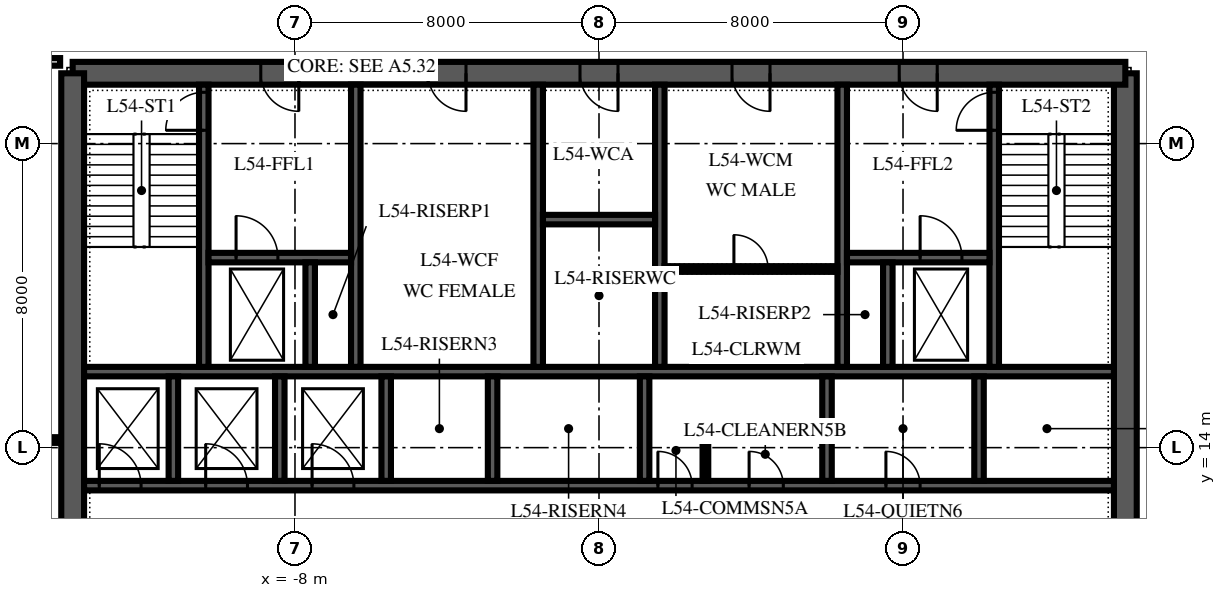
"""IFC4 building model, lengths in metres.
Left out: names, types, materials, properties, quantities, classifications, styles, units other than length and angle.
Written with IfcOpenShell. Run it as: python <this file> out.ifc"""

import sys

from ifc_helpers import new_model, si_unit, direction, frame, frame_2d, origin, place, context, subcontext, project, spatial, polyline, rectangle, outline, extrude, element, fill, save


model = new_model("IFC4")
c1 = context("Model", 3, precision=1e-05, world=origin(), true_north=direction((0.0, 1.0)))
c2 = subcontext(c1, "Body", "Model", "MODEL_VIEW")
j1 = project(units=[si_unit("LENGTHUNIT", "METRE"), si_unit("PLANEANGLEUNIT", "RADIAN")], contexts=[c1])
p1 = place(None, origin())
s1 = spatial("IfcSite", under=j1, at=p1, CompositionType="ELEMENT")
p2 = place(p1, origin())
s2 = spatial("IfcBuilding", under=s1, at=p2, CompositionType="ELEMENT")
p3 = place(p2, frame((0.0, 0.0, 234.0)))
s3 = spatial("IfcBuildingStorey", under=s2, at=p3, CompositionType="ELEMENT", Elevation=234.0)
p4 = place(p3, frame((13.85, 6.15, 0.0), z_axis=(0.0, 0.0, 1.0), x_axis=(0.0, 1.0, 0.0)))
e1 = element("IfcWall", 1, at=p4, inside=s3, PredefinedType="SHEAR", context=c2, shape_type="SweptSolid", body=[
    extrude(outline(polyline([(0.0, -0.3), (17.7, -0.3), (17.7, 0.0), (17.4, 0.0), (17.4, 0.3), (0.3, 0.3), (0.3, 0.0), (0.0, 0.0), (0.0, -0.3)])), origin(), (0.0, 0.0, 1.0), 4.0),
])
p5 = place(p4, frame((4.15, 0.0, 0.0)))
e2 = element("IfcOpeningElement", 2, at=p5, cuts=e1, PredefinedType="OPENING", context=c2, shape_type="SweptSolid", body=[
    extrude(rectangle(XDim=1.8, YDim=2.4, at=frame_2d((0.9, 1.2))), frame((0.0, 0.315, 0.0), z_axis=(0.0, -1.0, 0.0), x_axis=(1.0, 0.0, 0.0)), (0.0, 0.0, 1.0), 0.63),
])
p6 = place(p3, frame((13.85, 23.85, 0.0), z_axis=(0.0, 0.0, 1.0), x_axis=(-1.0, 0.0, 0.0)))
e3 = element("IfcWall", 3, at=p6, inside=s3, PredefinedType="SHEAR", context=c2, shape_type="SweptSolid", body=[
    extrude(rectangle(XDim=27.7, YDim=0.6, at=frame_2d((13.85, 0.0))), origin(), (0.0, 0.0, 1.0), 4.0),
])
p7 = place(p6, frame((21.75, 0.0, 0.0)))
e4 = element("IfcOpeningElement", 4, at=p7, cuts=e3, PredefinedType="OPENING", context=c2, shape_type="SweptSolid", body=[
    extrude(rectangle(XDim=1.0, YDim=2.1, at=frame_2d((0.5, 1.05))), frame((0.0, 0.315, 0.0), z_axis=(0.0, -1.0, 0.0), x_axis=(1.0, 0.0, 0.0)), (0.0, 0.0, 1.0), 0.63),
])
p8 = place(p6, frame((4.95, 0.0, 0.0)))
e5 = element("IfcOpeningElement", 5, at=p8, cuts=e3, PredefinedType="OPENING", context=c2, shape_type="SweptSolid", body=[
    extrude(rectangle(XDim=1.0, YDim=2.1, at=frame_2d((0.5, 1.05))), frame((0.0, 0.315, 0.0), z_axis=(0.0, -1.0, 0.0), x_axis=(1.0, 0.0, 0.0)), (0.0, 0.0, 1.0), 0.63),
])
p9 = place(p6, frame((17.35, 0.0, 0.0)))
e6 = element("IfcOpeningElement", 6, at=p9, cuts=e3, PredefinedType="OPENING", context=c2, shape_type="SweptSolid", body=[
    extrude(rectangle(XDim=1.0, YDim=2.1, at=frame_2d((0.5, 1.05))), frame((0.0, 0.315, 0.0), z_axis=(0.0, -1.0, 0.0), x_axis=(1.0, 0.0, 0.0)), (0.0, 0.0, 1.0), 0.63),
])
p10 = place(p6, frame((13.35, 0.0, 0.0)))
e7 = element("IfcOpeningElement", 7, at=p10, cuts=e3, PredefinedType="OPENING", context=c2, shape_type="SweptSolid", body=[
    extrude(rectangle(XDim=1.0, YDim=2.1, at=frame_2d((0.5, 1.05))), frame((0.0, 0.315, 0.0), z_axis=(0.0, -1.0, 0.0), x_axis=(1.0, 0.0, 0.0)), (0.0, 0.0, 1.0), 0.63),
])
p11 = place(p6, frame((9.35, 0.0, 0.0)))
e8 = element("IfcOpeningElement", 8, at=p11, cuts=e3, PredefinedType="OPENING", context=c2, shape_type="SweptSolid", body=[
    extrude(rectangle(XDim=1.0, YDim=2.1, at=frame_2d((0.5, 1.05))), frame((0.0, 0.315, 0.0), z_axis=(0.0, -1.0, 0.0), x_axis=(1.0, 0.0, 0.0)), (0.0, 0.0, 1.0), 0.63),
])
p12 = place(p3, frame((-13.85, 23.85, 0.0), z_axis=(0.0, 0.0, 1.0), x_axis=(0.0, -1.0, 0.0)))
e9 = element("IfcWall", 9, at=p12, inside=s3, PredefinedType="SHEAR", context=c2, shape_type="SweptSolid", body=[
    extrude(outline(polyline([(0.0, -0.3), (17.7, -0.3), (17.7, 0.0), (17.4, 0.0), (17.4, 0.3), (0.3, 0.3), (0.3, 0.0), (0.0, 0.0), (0.0, -0.3)])), origin(), (0.0, 0.0, 1.0), 4.0),
])
p13 = place(p12, frame((11.75, 0.0, 0.0)))
e10 = element("IfcOpeningElement", 10, at=p13, cuts=e9, PredefinedType="OPENING", context=c2, shape_type="SweptSolid", body=[
    extrude(rectangle(XDim=1.8, YDim=2.4, at=frame_2d((0.9, 1.2))), frame((0.0, 0.315, 0.0), z_axis=(0.0, -1.0, 0.0), x_axis=(1.0, 0.0, 0.0)), (0.0, 0.0, 1.0), 0.63),
])
p14 = place(p3, frame((-13.55, 13.0, 0.0), z_axis=(0.0, 0.0, 1.0), x_axis=(1.0, 0.0, 0.0)))
e11 = element("IfcWall", 11, at=p14, inside=s3, PredefinedType="SHEAR", context=c2, shape_type="SweptSolid", body=[
    extrude(rectangle(XDim=27.1, YDim=0.25, at=frame_2d((13.55, 0.0))), origin(), (0.0, 0.0, 1.0), 4.0),
])
p15 = place(p14, frame((0.4, 0.0, 0.0)))
e12 = element("IfcOpeningElement", 12, at=p15, cuts=e11, PredefinedType="OPENING", context=c2, shape_type="SweptSolid", body=[
    extrude(rectangle(XDim=1.1, YDim=2.1, at=frame_2d((0.55, 1.05))), frame((0.0, 0.14, 0.0), z_axis=(0.0, -1.0, 0.0), x_axis=(1.0, 0.0, 0.0)), (0.0, 0.0, 1.0), 0.28),
])
p16 = place(p14, frame((3.2, 0.0, 0.0)))
e13 = element("IfcOpeningElement", 13, at=p16, cuts=e11, PredefinedType="OPENING", context=c2, shape_type="SweptSolid", body=[
    extrude(rectangle(XDim=1.1, YDim=2.1, at=frame_2d((0.55, 1.05))), frame((0.0, 0.14, 0.0), z_axis=(0.0, -1.0, 0.0), x_axis=(1.0, 0.0, 0.0)), (0.0, 0.0, 1.0), 0.28),
])
p17 = place(p14, frame((6.0, 0.0, 0.0)))
e14 = element("IfcOpeningElement", 14, at=p17, cuts=e11, PredefinedType="OPENING", context=c2, shape_type="SweptSolid", body=[
    extrude(rectangle(XDim=1.1, YDim=2.1, at=frame_2d((0.55, 1.05))), frame((0.0, 0.14, 0.0), z_axis=(0.0, -1.0, 0.0), x_axis=(1.0, 0.0, 0.0)), (0.0, 0.0, 1.0), 0.28),
])
p18 = place(p14, frame((15.1, 0.0, 0.0)))
e15 = element("IfcOpeningElement", 15, at=p18, cuts=e11, PredefinedType="OPENING", context=c2, shape_type="SweptSolid", body=[
    extrude(rectangle(XDim=0.9, YDim=2.1, at=frame_2d((0.45, 1.05))), frame((0.0, 0.14, 0.0), z_axis=(0.0, -1.0, 0.0), x_axis=(1.0, 0.0, 0.0)), (0.0, 0.0, 1.0), 0.28),
])
p19 = place(p14, frame((17.5, 0.0, 0.0)))
e16 = element("IfcOpeningElement", 16, at=p19, cuts=e11, PredefinedType="OPENING", context=c2, shape_type="SweptSolid", body=[
    extrude(rectangle(XDim=0.9, YDim=2.1, at=frame_2d((0.45, 1.05))), frame((0.0, 0.14, 0.0), z_axis=(0.0, -1.0, 0.0), x_axis=(1.0, 0.0, 0.0)), (0.0, 0.0, 1.0), 0.28),
])
p20 = place(p14, frame((21.1, 0.0, 0.0)))
e17 = element("IfcOpeningElement", 17, at=p20, cuts=e11, PredefinedType="OPENING", context=c2, shape_type="SweptSolid", body=[
    extrude(rectangle(XDim=0.9, YDim=2.1, at=frame_2d((0.45, 1.05))), frame((0.0, 0.14, 0.0), z_axis=(0.0, -1.0, 0.0), x_axis=(1.0, 0.0, 0.0)), (0.0, 0.0, 1.0), 0.28),
])
p21 = place(p3, frame((-13.55, 16.0, 0.0), z_axis=(0.0, 0.0, 1.0), x_axis=(1.0, 0.0, 0.0)))
e18 = element("IfcWall", 18, at=p21, inside=s3, PredefinedType="SHEAR", context=c2, shape_type="SweptSolid", body=[
    extrude(rectangle(XDim=27.1, YDim=0.25, at=frame_2d((13.55, 0.0))), origin(), (0.0, 0.0, 1.0), 4.0),
])
for number, where, z_axis, x_axis in (
    (19, (-11.2, 13.125, 0.0), (0.0, 0.0, 1.0), (0.0, 1.0, 0.0)),
    (20, (-8.4, 13.125, 0.0), (0.0, 0.0, 1.0), (0.0, 1.0, 0.0)),
    (21, (-5.6, 13.125, 0.0), (0.0, 0.0, 1.0), (0.0, 1.0, 0.0)),
    (22, (-2.8, 13.125, 0.0), (0.0, 0.0, 1.0), (0.0, 1.0, 0.0)),
    (23, (1.2, 13.125, 0.0), (0.0, 0.0, 1.0), (0.0, 1.0, 0.0)),
    (24, (6.0, 13.125, 0.0), (0.0, 0.0, 1.0), (0.0, 1.0, 0.0)),
    (25, (10.0, 13.125, 0.0), (0.0, 0.0, 1.0), (0.0, 1.0, 0.0)),
):
    element("IfcWall", number, at=place(p3, frame(where, z_axis=z_axis, x_axis=x_axis)), inside=s3, PredefinedType="SHEAR", context=c2, shape_type="SweptSolid", body=[
        extrude(rectangle(XDim=2.75, YDim=0.25, at=frame_2d((1.375, 0.0))), origin(), (0.0, 0.0, 1.0), 4.0),
    ])
p22 = place(p3, frame((-10.4, 16.125, 0.0), z_axis=(0.0, 0.0, 1.0), x_axis=(0.0, 1.0, 0.0)))
e26 = element("IfcWall", 26, at=p22, inside=s3, PredefinedType="SHEAR", context=c2, shape_type="SweptSolid", body=[
    extrude(rectangle(XDim=7.425, YDim=0.25, at=frame_2d((3.712, 0.0))), origin(), (0.0, 0.0, 1.0), 4.0),
])
p23 = place(p22, frame((6.225, 0.0, 0.0)))
e27 = element("IfcOpeningElement", 27, at=p23, cuts=e26, PredefinedType="OPENING", context=c2, shape_type="SweptSolid", body=[
    extrude(rectangle(XDim=1.0, YDim=2.1, at=frame_2d((0.5, 1.05))), frame((0.0, 0.14, 0.0), z_axis=(0.0, -1.0, 0.0), x_axis=(1.0, 0.0, 0.0)), (0.0, 0.0, 1.0), 0.28),
])
for number, where, z_axis, x_axis in (
    (28, (-6.4, 16.125, 0.0), (0.0, 0.0, 1.0), (0.0, 1.0, 0.0)),
    (29, (-1.6, 16.125, 0.0), (0.0, 0.0, 1.0), (0.0, 1.0, 0.0)),
    (30, (1.6, 16.125, 0.0), (0.0, 0.0, 1.0), (0.0, 1.0, 0.0)),
    (31, (6.4, 16.125, 0.0), (0.0, 0.0, 1.0), (0.0, 1.0, 0.0)),
):
    element("IfcWall", number, at=place(p3, frame(where, z_axis=z_axis, x_axis=x_axis)), inside=s3, PredefinedType="SHEAR", context=c2, shape_type="SweptSolid", body=[
        extrude(rectangle(XDim=7.425, YDim=0.25, at=frame_2d((3.712, 0.0))), origin(), (0.0, 0.0, 1.0), 4.0),
    ])
p24 = place(p3, frame((10.4, 16.125, 0.0), z_axis=(0.0, 0.0, 1.0), x_axis=(0.0, 1.0, 0.0)))
e32 = element("IfcWall", 32, at=p24, inside=s3, PredefinedType="SHEAR", context=c2, shape_type="SweptSolid", body=[
    extrude(rectangle(XDim=7.425, YDim=0.25, at=frame_2d((3.712, 0.0))), origin(), (0.0, 0.0, 1.0), 4.0),
])
p25 = place(p24, frame((6.225, 0.0, 0.0)))
e33 = element("IfcOpeningElement", 33, at=p25, cuts=e32, PredefinedType="OPENING", context=c2, shape_type="SweptSolid", body=[
    extrude(rectangle(XDim=1.0, YDim=2.1, at=frame_2d((0.5, 1.05))), frame((0.0, 0.14, 0.0), z_axis=(0.0, -1.0, 0.0), x_axis=(1.0, 0.0, 0.0)), (0.0, 0.0, 1.0), 0.28),
])
p26 = place(p3, frame((-10.275, 19.0, 0.0), z_axis=(0.0, 0.0, 1.0), x_axis=(1.0, 0.0, 0.0)))
e34 = element("IfcWall", 34, at=p26, inside=s3, PredefinedType="SHEAR", context=c2, shape_type="SweptSolid", body=[
    extrude(rectangle(XDim=3.75, YDim=0.25, at=frame_2d((1.875, 0.0))), origin(), (0.0, 0.0, 1.0), 4.0),
])
p27 = place(p26, frame((0.725, 0.0, 0.0)))
e35 = element("IfcOpeningElement", 35, at=p27, cuts=e34, PredefinedType="OPENING", context=c2, shape_type="SweptSolid", body=[
    extrude(rectangle(XDim=1.1, YDim=2.1, at=frame_2d((0.55, 1.05))), frame((0.0, 0.14, 0.0), z_axis=(0.0, -1.0, 0.0), x_axis=(1.0, 0.0, 0.0)), (0.0, 0.0, 1.0), 0.28),
])
p28 = place(p3, frame((6.525, 19.0, 0.0), z_axis=(0.0, 0.0, 1.0), x_axis=(1.0, 0.0, 0.0)))
e36 = element("IfcWall", 36, at=p28, inside=s3, PredefinedType="SHEAR", context=c2, shape_type="SweptSolid", body=[
    extrude(rectangle(XDim=3.75, YDim=0.25, at=frame_2d((1.875, 0.0))), origin(), (0.0, 0.0, 1.0), 4.0),
])
p29 = place(p28, frame((1.925, 0.0, 0.0)))
e37 = element("IfcOpeningElement", 37, at=p29, cuts=e36, PredefinedType="OPENING", context=c2, shape_type="SweptSolid", body=[
    extrude(rectangle(XDim=1.1, YDim=2.1, at=frame_2d((0.55, 1.05))), frame((0.0, 0.14, 0.0), z_axis=(0.0, -1.0, 0.0), x_axis=(1.0, 0.0, 0.0)), (0.0, 0.0, 1.0), 0.28),
])
for number, where, z_axis, x_axis in (
    (38, (-7.6, 16.125, 0.0), (0.0, 0.0, 1.0), (0.0, 1.0, 0.0)),
    (39, (7.6, 16.125, 0.0), (0.0, 0.0, 1.0), (0.0, 1.0, 0.0)),
):
    element("IfcWall", number, at=place(p3, frame(where, z_axis=z_axis, x_axis=x_axis)), inside=s3, PredefinedType="SHEAR", context=c2, shape_type="SweptSolid", body=[
        extrude(rectangle(XDim=2.75, YDim=0.25, at=frame_2d((1.375, 0.0))), origin(), (0.0, 0.0, 1.0), 4.0),
    ])
p30 = place(p3, frame((-1.475, 20.0, 0.0), z_axis=(0.0, 0.0, 1.0), x_axis=(1.0, 0.0, 0.0)))
e40 = element("IfcWall", 40, at=p30, inside=s3, PredefinedType="SHEAR", context=c2, shape_type="SweptSolid", body=[
    extrude(rectangle(XDim=2.95, YDim=0.25, at=frame_2d((1.475, 0.0))), origin(), (0.0, 0.0, 1.0), 4.0),
])
p31 = place(p3, frame((1.725, 18.7, 0.0), z_axis=(0.0, 0.0, 1.0), x_axis=(1.0, 0.0, 0.0)))
e41 = element("IfcWall", 41, at=p31, inside=s3, PredefinedType="PARTITIONING", context=c2, shape_type="SweptSolid", body=[
    extrude(rectangle(XDim=4.55, YDim=0.15, at=frame_2d((2.275, 0.0))), origin(), (0.0, 0.0, 1.0), 3.85),
])
p32 = place(p31, frame((1.825, 0.0, 0.0)))
e42 = element("IfcOpeningElement", 42, at=p32, cuts=e41, PredefinedType="OPENING", context=c2, shape_type="SweptSolid", body=[
    extrude(rectangle(XDim=0.9, YDim=2.1, at=frame_2d((0.45, 1.05))), frame((0.0, 0.09, 0.0), z_axis=(0.0, -1.0, 0.0), x_axis=(1.0, 0.0, 0.0)), (0.0, 0.0, 1.0), 0.18),
])
p33 = place(p3, frame((2.8, 13.125, 0.0), z_axis=(0.0, 0.0, 1.0), x_axis=(0.0, 1.0, 0.0)))
e43 = element("IfcWall", 43, at=p33, inside=s3, PredefinedType="PARTITIONING", context=c2, shape_type="SweptSolid", body=[
    extrude(rectangle(XDim=1.55, YDim=0.15, at=frame_2d((0.775, 0.0))), origin(), (0.0, 0.0, 1.0), 3.85),
])
p34 = place(p3, frame((2.875, 14.6, 0.0), z_axis=(0.0, 0.0, 1.0), x_axis=(1.0, 0.0, 0.0)))
e44 = element("IfcWall", 44, at=p34, inside=s3, PredefinedType="PARTITIONING", context=c2, shape_type="SweptSolid", body=[
    extrude(rectangle(XDim=3.0, YDim=0.15, at=frame_2d((1.5, 0.0))), origin(), (0.0, 0.0, 1.0), 3.85),
])
p35 = place(p3, frame((-20.075, 14.2, 0.0), z_axis=(0.0, 0.0, 1.0), x_axis=(1.0, 0.0, 0.0)))
e45 = element("IfcWall", 45, at=p35, inside=s3, PredefinedType="PARTITIONING", context=c2, shape_type="SweptSolid", body=[
    extrude(rectangle(XDim=5.895, YDim=0.15, at=frame_2d((2.948, 0.0))), origin(), (0.0, 0.0, 1.0), 3.25),
])
p36 = place(p3, frame((-16.1, 24.15, 0.0), z_axis=(0.0, 0.0, 1.0), x_axis=(1.0, 0.0, 0.0)))
e46 = element("IfcWall", 46, at=p36, inside=s3, PredefinedType="PARTITIONING", context=c2, shape_type="SweptSolid", body=[
    extrude(rectangle(XDim=1.92, YDim=0.2, at=frame_2d((0.96, 0.0))), origin(), (0.0, 0.0, 1.0), 3.4),
])
p37 = place(p7, origin())
e47 = element("IfcDoor", 47, at=p37, inside=s3, OperationType="SINGLE_SWING_RIGHT", PredefinedType="DOOR", context=c2, shape_type="SweptSolid", body=[
    extrude(rectangle(XDim=1.0, YDim=2.1, at=frame_2d((0.5, 1.05))), frame((0.0, 0.3, 0.0), z_axis=(0.0, -1.0, 0.0), x_axis=(1.0, 0.0, 0.0)), (0.0, 0.0, 1.0), 0.6),
])
fill(e4, e47)
p38 = place(p8, origin())
e48 = element("IfcDoor", 48, at=p38, inside=s3, OperationType="SINGLE_SWING_RIGHT", PredefinedType="DOOR", context=c2, shape_type="SweptSolid", body=[
    extrude(rectangle(XDim=1.0, YDim=2.1, at=frame_2d((0.5, 1.05))), frame((0.0, 0.3, 0.0), z_axis=(0.0, -1.0, 0.0), x_axis=(1.0, 0.0, 0.0)), (0.0, 0.0, 1.0), 0.6),
])
fill(e5, e48)
p39 = place(p9, origin())
e49 = element("IfcDoor", 49, at=p39, inside=s3, OperationType="SINGLE_SWING_LEFT", PredefinedType="DOOR", context=c2, shape_type="SweptSolid", body=[
    extrude(rectangle(XDim=1.0, YDim=2.1, at=frame_2d((0.5, 1.05))), frame((0.0, 0.3, 0.0), z_axis=(0.0, -1.0, 0.0), x_axis=(1.0, 0.0, 0.0)), (0.0, 0.0, 1.0), 0.6),
])
fill(e6, e49)
p40 = place(p10, origin())
e50 = element("IfcDoor", 50, at=p40, inside=s3, OperationType="SINGLE_SWING_LEFT", PredefinedType="DOOR", context=c2, shape_type="SweptSolid", body=[
    extrude(rectangle(XDim=1.0, YDim=2.1, at=frame_2d((0.5, 1.05))), frame((0.0, 0.3, 0.0), z_axis=(0.0, -1.0, 0.0), x_axis=(1.0, 0.0, 0.0)), (0.0, 0.0, 1.0), 0.6),
])
fill(e7, e50)
p41 = place(p11, origin())
e51 = element("IfcDoor", 51, at=p41, inside=s3, OperationType="SINGLE_SWING_LEFT", PredefinedType="DOOR", context=c2, shape_type="SweptSolid", body=[
    extrude(rectangle(XDim=1.0, YDim=2.1, at=frame_2d((0.5, 1.05))), frame((0.0, 0.3, 0.0), z_axis=(0.0, -1.0, 0.0), x_axis=(1.0, 0.0, 0.0)), (0.0, 0.0, 1.0), 0.6),
])
fill(e8, e51)
p42 = place(p23, origin())
e52 = element("IfcDoor", 52, at=p42, inside=s3, OperationType="SINGLE_SWING_LEFT", PredefinedType="DOOR", context=c2, shape_type="SweptSolid", body=[
    extrude(rectangle(XDim=1.0, YDim=2.1, at=frame_2d((0.5, 1.05))), frame((0.0, 0.125, 0.0), z_axis=(0.0, -1.0, 0.0), x_axis=(1.0, 0.0, 0.0)), (0.0, 0.0, 1.0), 0.25),
])
fill(e27, e52)
p43 = place(p25, origin())
e53 = element("IfcDoor", 53, at=p43, inside=s3, OperationType="SINGLE_SWING_LEFT", PredefinedType="DOOR", context=c2, shape_type="SweptSolid", body=[
    extrude(rectangle(XDim=1.0, YDim=2.1, at=frame_2d((0.5, 1.05))), frame((0.0, 0.125, 0.0), z_axis=(0.0, -1.0, 0.0), x_axis=(1.0, 0.0, 0.0)), (0.0, 0.0, 1.0), 0.25),
])
fill(e33, e53)
p44 = place(p15, origin())
e54 = element("IfcDoor", 54, at=p44, inside=s3, OperationType="SLIDING_TO_LEFT", PredefinedType="DOOR", context=c2, shape_type="SweptSolid", body=[
    extrude(rectangle(XDim=1.1, YDim=2.1, at=frame_2d((0.55, 1.05))), frame((0.0, 0.125, 0.0), z_axis=(0.0, -1.0, 0.0), x_axis=(1.0, 0.0, 0.0)), (0.0, 0.0, 1.0), 0.25),
])
fill(e12, e54)
p45 = place(p16, origin())
e55 = element("IfcDoor", 55, at=p45, inside=s3, OperationType="SLIDING_TO_LEFT", PredefinedType="DOOR", context=c2, shape_type="SweptSolid", body=[
    extrude(rectangle(XDim=1.1, YDim=2.1, at=frame_2d((0.55, 1.05))), frame((0.0, 0.125, 0.0), z_axis=(0.0, -1.0, 0.0), x_axis=(1.0, 0.0, 0.0)), (0.0, 0.0, 1.0), 0.25),
])
fill(e13, e55)
p46 = place(p17, origin())
e56 = element("IfcDoor", 56, at=p46, inside=s3, OperationType="SLIDING_TO_LEFT", PredefinedType="DOOR", context=c2, shape_type="SweptSolid", body=[
    extrude(rectangle(XDim=1.1, YDim=2.1, at=frame_2d((0.55, 1.05))), frame((0.0, 0.125, 0.0), z_axis=(0.0, -1.0, 0.0), x_axis=(1.0, 0.0, 0.0)), (0.0, 0.0, 1.0), 0.25),
])
fill(e14, e56)
p47 = place(p29, origin())
e57 = element("IfcDoor", 57, at=p47, inside=s3, OperationType="SLIDING_TO_RIGHT", PredefinedType="DOOR", context=c2, shape_type="SweptSolid", body=[
    extrude(rectangle(XDim=1.1, YDim=2.1, at=frame_2d((0.55, 1.05))), frame((0.0, 0.125, 0.0), z_axis=(0.0, -1.0, 0.0), x_axis=(1.0, 0.0, 0.0)), (0.0, 0.0, 1.0), 0.25),
])
fill(e37, e57)
p48 = place(p27, origin())
e58 = element("IfcDoor", 58, at=p48, inside=s3, OperationType="SLIDING_TO_RIGHT", PredefinedType="DOOR", context=c2, shape_type="SweptSolid", body=[
    extrude(rectangle(XDim=1.1, YDim=2.1, at=frame_2d((0.55, 1.05))), frame((0.0, 0.125, 0.0), z_axis=(0.0, -1.0, 0.0), x_axis=(1.0, 0.0, 0.0)), (0.0, 0.0, 1.0), 0.25),
])
fill(e35, e58)
p49 = place(p18, origin())
e59 = element("IfcDoor", 59, at=p49, inside=s3, OperationType="SINGLE_SWING_LEFT", PredefinedType="DOOR", context=c2, shape_type="SweptSolid", body=[
    extrude(rectangle(XDim=0.9, YDim=2.1, at=frame_2d((0.45, 1.05))), frame((0.0, 0.125, 0.0), z_axis=(0.0, -1.0, 0.0), x_axis=(1.0, 0.0, 0.0)), (0.0, 0.0, 1.0), 0.25),
])
fill(e15, e59)
p50 = place(p19, origin())
e60 = element("IfcDoor", 60, at=p50, inside=s3, OperationType="SINGLE_SWING_LEFT", PredefinedType="DOOR", context=c2, shape_type="SweptSolid", body=[
    extrude(rectangle(XDim=0.9, YDim=2.1, at=frame_2d((0.45, 1.05))), frame((0.0, 0.125, 0.0), z_axis=(0.0, -1.0, 0.0), x_axis=(1.0, 0.0, 0.0)), (0.0, 0.0, 1.0), 0.25),
])
fill(e16, e60)
p51 = place(p20, origin())
e61 = element("IfcDoor", 61, at=p51, inside=s3, OperationType="SINGLE_SWING_LEFT", PredefinedType="DOOR", context=c2, shape_type="SweptSolid", body=[
    extrude(rectangle(XDim=0.9, YDim=2.1, at=frame_2d((0.45, 1.05))), frame((0.0, 0.125, 0.0), z_axis=(0.0, -1.0, 0.0), x_axis=(1.0, 0.0, 0.0)), (0.0, 0.0, 1.0), 0.25),
])
fill(e17, e61)
p52 = place(p32, origin())
e62 = element("IfcDoor", 62, at=p52, inside=s3, OperationType="SINGLE_SWING_LEFT", PredefinedType="DOOR", context=c2, shape_type="SweptSolid", body=[
    extrude(rectangle(XDim=0.9, YDim=2.1, at=frame_2d((0.45, 1.05))), frame((0.0, 0.075, 0.0), z_axis=(0.0, -1.0, 0.0), x_axis=(1.0, 0.0, 0.0)), (0.0, 0.0, 1.0), 0.149),
])
fill(e42, e62)
save(model, sys.argv[1])
